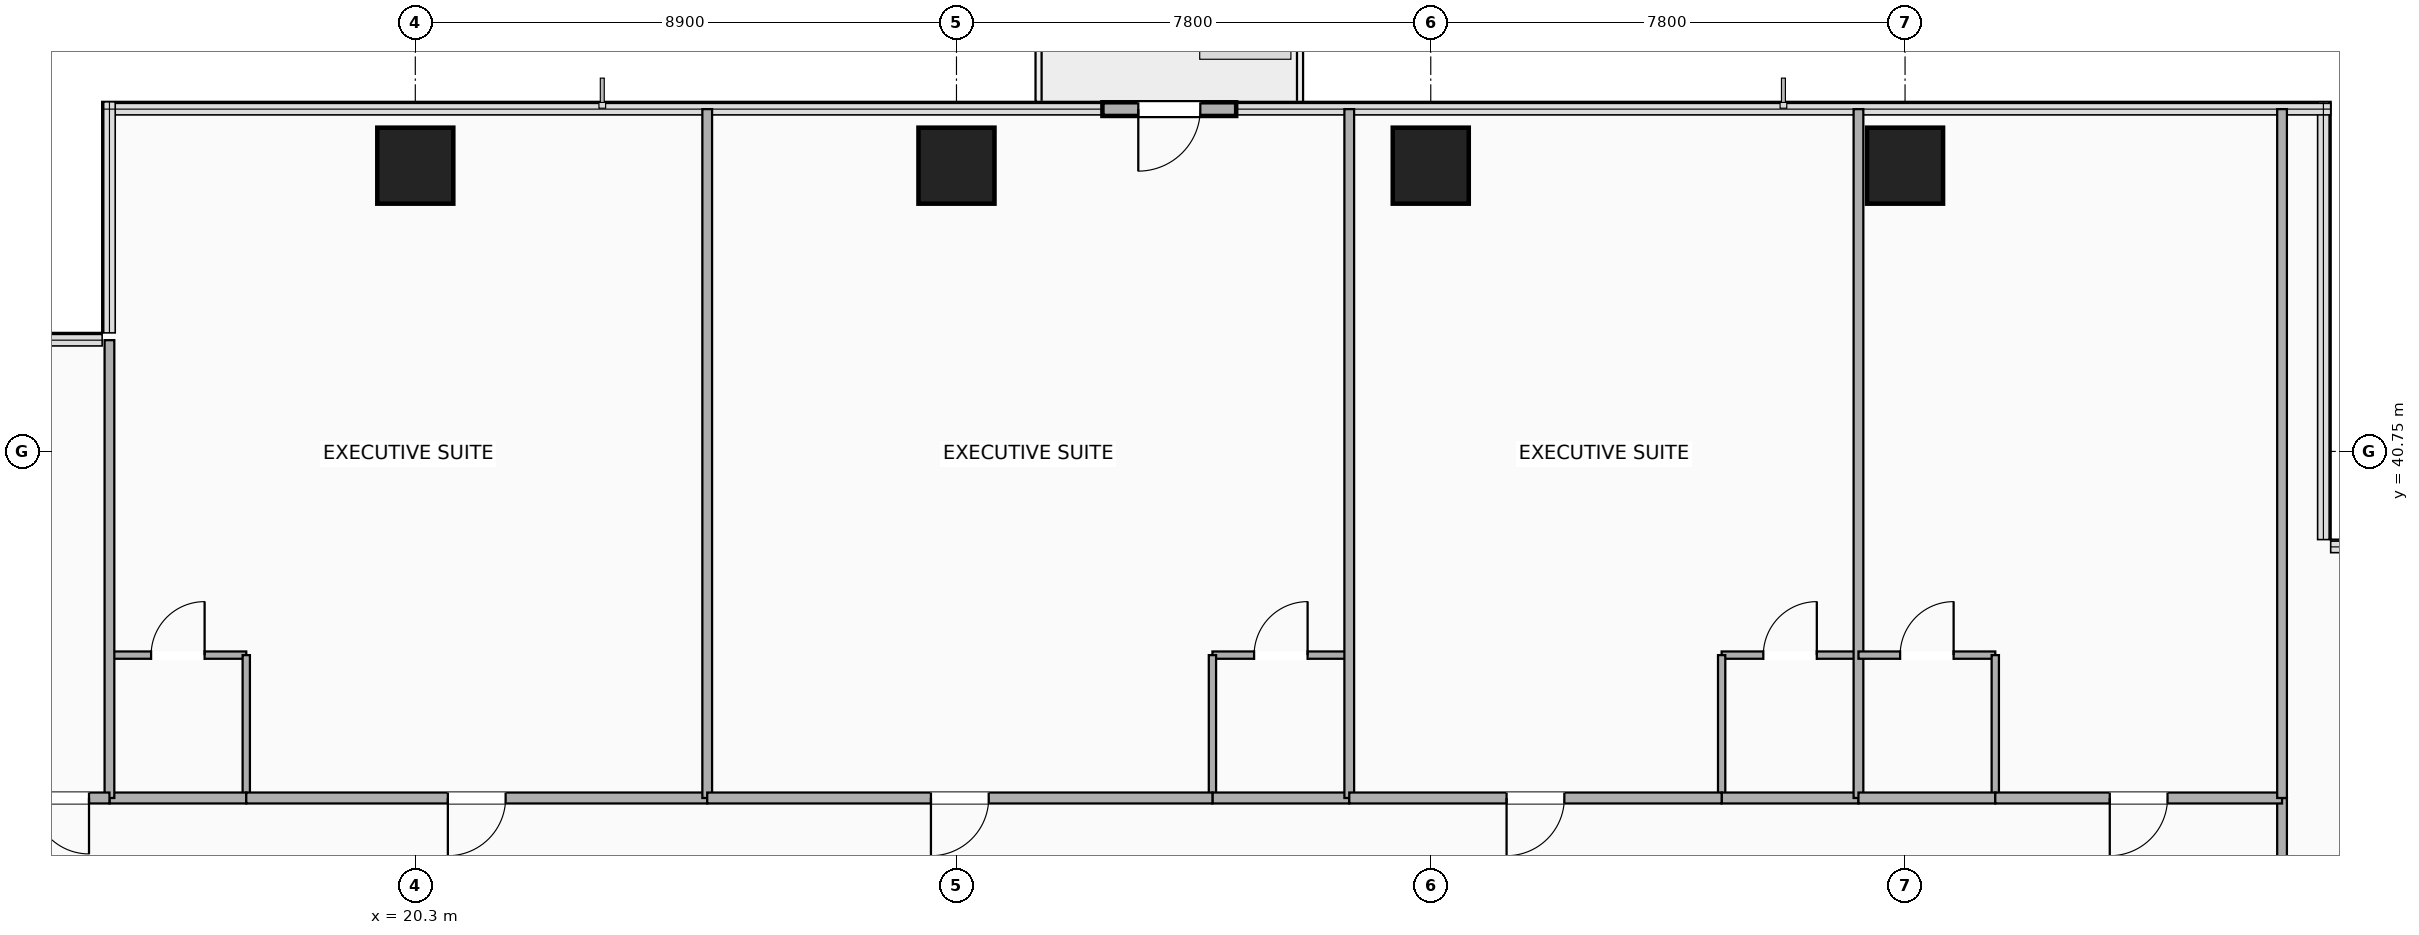
"""IFC4 building model, lengths in metres.
Left out: names, types, materials, properties, quantities, classifications, styles, units other than length and angle.
Written with IfcOpenShell. Run it as: python <this file> out.ifc"""

import sys

from ifc_helpers import new_model, si_unit, direction, frame, frame_2d, origin, origin_2d, place, context, subcontext, project, spatial, rectangle, extrude, element, fill, save


model = new_model("IFC4")
c1 = context("Model", 3, precision=1e-05, world=origin(), true_north=direction((0.0, 1.0)))
c2 = subcontext(c1, "Body", "Model", "MODEL_VIEW")
j1 = project(units=[si_unit("LENGTHUNIT", "METRE"), si_unit("PLANEANGLEUNIT", "RADIAN")], contexts=[c1])
p1 = place(None, origin())
s1 = spatial("IfcSite", under=j1, at=p1, CompositionType="ELEMENT")
p2 = place(p1, origin())
s2 = spatial("IfcBuilding", under=s1, at=p2, CompositionType="ELEMENT")
p3 = place(p2, frame((0.0, 0.0, 98.7)))
s3 = spatial("IfcBuildingStorey", under=s2, at=p3, CompositionType="ELEMENT", Elevation=98.7)
for number, where, z_axis, x_axis in (
    (1, (20.3, 45.45, -0.26), (0.0, 0.0, 1.0), (1.0, 0.0, 0.0)),
    (2, (29.2, 45.45, -0.26), (0.0, 0.0, 1.0), (1.0, 0.0, 0.0)),
    (3, (37.0, 45.45, -0.26), (0.0, 0.0, 1.0), (1.0, 0.0, 0.0)),
    (4, (44.8, 45.45, -0.26), (0.0, 0.0, 1.0), (1.0, 0.0, 0.0)),
):
    element("IfcColumn", number, at=place(p3, frame(where, z_axis=z_axis, x_axis=x_axis)), inside=s3, PredefinedType="COLUMN", context=c2, shape_type="SweptSolid", body=[
        extrude(rectangle(XDim=1.25, YDim=1.25, at=origin_2d()), origin(), (0.0, 0.0, 1.0), 3.5),
    ])
p4 = place(p3, frame((31.6, 46.38, 0.0), z_axis=(0.0, 0.0, 1.0), x_axis=(1.0, 0.0, 0.0)))
e5 = element("IfcWall", 5, at=p4, inside=s3, PredefinedType="SOLIDWALL", context=c2, shape_type="SweptSolid", body=[
    extrude(rectangle(XDim=2.2, YDim=0.225, at=frame_2d((1.1, 0.0))), origin(), (0.0, 0.0, 1.0), 3.24),
])
p5 = place(p4, frame((0.59, 0.0, 0.0)))
e6 = element("IfcOpeningElement", 6, at=p5, cuts=e5, PredefinedType="OPENING", context=c2, shape_type="SweptSolid", body=[
    extrude(rectangle(XDim=1.02, YDim=2.1, at=frame_2d((0.51, 1.05))), frame((0.0, 0.123, 0.0), z_axis=(0.0, -1.0, 0.0), x_axis=(1.0, 0.0, 0.0)), (0.0, 0.0, 1.0), 0.245),
])
p6 = place(p3, frame((51.0, 33.0, 0.0), z_axis=(0.0, 0.0, 1.0), x_axis=(0.0, 1.0, 0.0)))
e7 = element("IfcWall", 7, at=p6, inside=s3, PredefinedType="PARTITIONING", context=c2, shape_type="SweptSolid", body=[
    extrude(rectangle(XDim=2.05, YDim=0.16, at=frame_2d((1.025, 0.0))), origin(), (0.0, 0.0, 1.0), 2.313),
])
p7 = place(p3, frame((15.27, 37.4, 0.0), z_axis=(0.0, 0.0, 1.0), x_axis=(1.0, 0.0, 0.0)))
e8 = element("IfcWall", 8, at=p7, inside=s3, PredefinedType="PARTITIONING", context=c2, shape_type="SweptSolid", body=[
    extrude(rectangle(XDim=2.25, YDim=0.12, at=frame_2d((1.125, 0.0))), origin(), (0.0, 0.0, 1.0), 3.24),
])
p8 = place(p7, frame((1.565, 0.0, 0.0), z_axis=(0.0, 0.0, 1.0), x_axis=(-1.0, 0.0, 0.0)))
e9 = element("IfcOpeningElement", 9, at=p8, cuts=e8, PredefinedType="OPENING", context=c2, shape_type="SweptSolid", body=[
    extrude(rectangle(XDim=0.88, YDim=2.08, at=frame_2d((0.44, 1.04))), frame((0.0, 0.07, 0.0), z_axis=(0.0, -1.0, 0.0), x_axis=(1.0, 0.0, 0.0)), (0.0, 0.0, 1.0), 0.14),
])
p9 = place(p3, frame((17.52, 35.05, 0.0), z_axis=(0.0, 0.0, 1.0), x_axis=(0.0, 1.0, 0.0)))
e10 = element("IfcWall", 10, at=p9, inside=s3, PredefinedType="PARTITIONING", context=c2, shape_type="SweptSolid", body=[
    extrude(rectangle(XDim=2.35, YDim=0.12, at=frame_2d((1.175, 0.0))), origin(), (0.0, 0.0, 1.0), 3.24),
])
p10 = place(p3, frame((15.27, 35.05, 0.0), z_axis=(0.0, 0.0, 1.0), x_axis=(1.0, 0.0, 0.0)))
e11 = element("IfcWall", 11, at=p10, inside=s3, PredefinedType="PARTITIONING", context=c2, shape_type="SweptSolid", body=[
    extrude(rectangle(XDim=2.25, YDim=0.18, at=frame_2d((1.125, 0.0))), origin(), (0.0, 0.0, 1.0), 3.24),
])
p11 = place(p3, frame((17.52, 35.05, 0.0), z_axis=(0.0, 0.0, 1.0), x_axis=(1.0, 0.0, 0.0)))
e12 = element("IfcWall", 12, at=p11, inside=s3, PredefinedType="PARTITIONING", context=c2, shape_type="SweptSolid", body=[
    extrude(rectangle(XDim=7.581, YDim=0.18, at=frame_2d((3.79, 0.0))), origin(), (0.0, 0.0, 1.0), 2.313),
])
p12 = place(p11, frame((3.315, 0.0, 0.0)))
e13 = element("IfcOpeningElement", 13, at=p12, cuts=e12, PredefinedType="OPENING", context=c2, shape_type="SweptSolid", body=[
    extrude(rectangle(XDim=0.95, YDim=2.15, at=frame_2d((0.475, 1.075))), frame((0.0, 0.1, 0.0), z_axis=(0.0, -1.0, 0.0), x_axis=(1.0, 0.0, 0.0)), (0.0, 0.0, 1.0), 0.2),
])
p13 = place(p3, frame((15.27, 35.05, 0.0), z_axis=(0.0, 0.0, 1.0), x_axis=(0.0, 1.0, 0.0)))
e14 = element("IfcWall", 14, at=p13, inside=s3, PredefinedType="PARTITIONING", context=c2, shape_type="SweptSolid", body=[
    extrude(rectangle(XDim=7.53, YDim=0.16, at=frame_2d((3.765, 0.0))), origin(), (0.0, 0.0, 1.0), 3.24),
])
p14 = place(p3, frame((25.101, 35.05, 0.0), z_axis=(0.0, 0.0, 1.0), x_axis=(0.0, 1.0, 0.0)))
e15 = element("IfcWall", 15, at=p14, inside=s3, PredefinedType="PARTITIONING", context=c2, shape_type="SweptSolid", body=[
    extrude(rectangle(XDim=11.33, YDim=0.16, at=frame_2d((5.665, 0.0))), origin(), (0.0, 0.0, 1.0), 2.603),
])
p15 = place(p3, frame((33.41, 37.4, 0.0), z_axis=(0.0, 0.0, 1.0), x_axis=(1.0, 0.0, 0.0)))
e16 = element("IfcWall", 16, at=p15, inside=s3, PredefinedType="PARTITIONING", context=c2, shape_type="SweptSolid", body=[
    extrude(rectangle(XDim=2.25, YDim=0.12, at=frame_2d((1.125, 0.0))), origin(), (0.0, 0.0, 1.0), 3.24),
])
p16 = place(p15, frame((1.565, 0.0, 0.0), z_axis=(0.0, 0.0, 1.0), x_axis=(-1.0, 0.0, 0.0)))
e17 = element("IfcOpeningElement", 17, at=p16, cuts=e16, PredefinedType="OPENING", context=c2, shape_type="SweptSolid", body=[
    extrude(rectangle(XDim=0.88, YDim=2.08, at=frame_2d((0.44, 1.04))), frame((0.0, 0.07, 0.0), z_axis=(0.0, -1.0, 0.0), x_axis=(1.0, 0.0, 0.0)), (0.0, 0.0, 1.0), 0.14),
])
p17 = place(p3, frame((33.41, 35.05, 0.0), z_axis=(0.0, 0.0, 1.0), x_axis=(0.0, 1.0, 0.0)))
e18 = element("IfcWall", 18, at=p17, inside=s3, PredefinedType="PARTITIONING", context=c2, shape_type="SweptSolid", body=[
    extrude(rectangle(XDim=2.35, YDim=0.12, at=frame_2d((1.175, 0.0))), origin(), (0.0, 0.0, 1.0), 2.922),
])
p18 = place(p3, frame((33.41, 35.05, 0.0), z_axis=(0.0, 0.0, 1.0), x_axis=(1.0, 0.0, 0.0)))
e19 = element("IfcWall", 19, at=p18, inside=s3, PredefinedType="PARTITIONING", context=c2, shape_type="SweptSolid", body=[
    extrude(rectangle(XDim=2.25, YDim=0.18, at=frame_2d((1.125, 0.0))), origin(), (0.0, 0.0, 1.0), 3.24),
])
p19 = place(p3, frame((25.101, 35.05, 0.0), z_axis=(0.0, 0.0, 1.0), x_axis=(1.0, 0.0, 0.0)))
e20 = element("IfcWall", 20, at=p19, inside=s3, PredefinedType="PARTITIONING", context=c2, shape_type="SweptSolid", body=[
    extrude(rectangle(XDim=8.309, YDim=0.18, at=frame_2d((4.155, 0.0))), origin(), (0.0, 0.0, 1.0), 2.313),
])
p20 = place(p19, frame((3.679, 0.0, 0.0)))
e21 = element("IfcOpeningElement", 21, at=p20, cuts=e20, PredefinedType="OPENING", context=c2, shape_type="SweptSolid", body=[
    extrude(rectangle(XDim=0.95, YDim=2.15, at=frame_2d((0.475, 1.075))), frame((0.0, 0.1, 0.0), z_axis=(0.0, -1.0, 0.0), x_axis=(1.0, 0.0, 0.0)), (0.0, 0.0, 1.0), 0.2),
])
p21 = place(p3, frame((35.66, 35.05, 0.0), z_axis=(0.0, 0.0, 1.0), x_axis=(0.0, 1.0, 0.0)))
e22 = element("IfcWall", 22, at=p21, inside=s3, PredefinedType="PARTITIONING", context=c2, shape_type="SweptSolid", body=[
    extrude(rectangle(XDim=11.33, YDim=0.16, at=frame_2d((5.665, 0.0))), origin(), (0.0, 0.0, 1.0), 2.603),
])
p22 = place(p3, frame((41.784, 37.4, 0.0), z_axis=(0.0, 0.0, 1.0), x_axis=(1.0, 0.0, 0.0)))
e23 = element("IfcWall", 23, at=p22, inside=s3, PredefinedType="PARTITIONING", context=c2, shape_type="SweptSolid", body=[
    extrude(rectangle(XDim=2.25, YDim=0.12, at=frame_2d((1.125, 0.0))), origin(), (0.0, 0.0, 1.0), 3.24),
])
p23 = place(p22, frame((1.565, 0.0, 0.0), z_axis=(0.0, 0.0, 1.0), x_axis=(-1.0, 0.0, 0.0)))
e24 = element("IfcOpeningElement", 24, at=p23, cuts=e23, PredefinedType="OPENING", context=c2, shape_type="SweptSolid", body=[
    extrude(rectangle(XDim=0.88, YDim=2.08, at=frame_2d((0.44, 1.04))), frame((0.0, 0.07, 0.0), z_axis=(0.0, -1.0, 0.0), x_axis=(1.0, 0.0, 0.0)), (0.0, 0.0, 1.0), 0.14),
])
p24 = place(p3, frame((41.784, 35.05, 0.0), z_axis=(0.0, 0.0, 1.0), x_axis=(0.0, 1.0, 0.0)))
e25 = element("IfcWall", 25, at=p24, inside=s3, PredefinedType="PARTITIONING", context=c2, shape_type="SweptSolid", body=[
    extrude(rectangle(XDim=2.35, YDim=0.12, at=frame_2d((1.175, 0.0))), origin(), (0.0, 0.0, 1.0), 2.922),
])
p25 = place(p3, frame((41.784, 35.05, 0.0), z_axis=(0.0, 0.0, 1.0), x_axis=(1.0, 0.0, 0.0)))
e26 = element("IfcWall", 26, at=p25, inside=s3, PredefinedType="PARTITIONING", context=c2, shape_type="SweptSolid", body=[
    extrude(rectangle(XDim=2.25, YDim=0.18, at=frame_2d((1.125, 0.0))), origin(), (0.0, 0.0, 1.0), 3.24),
])
p26 = place(p3, frame((35.66, 35.05, 0.0), z_axis=(0.0, 0.0, 1.0), x_axis=(1.0, 0.0, 0.0)))
e27 = element("IfcWall", 27, at=p26, inside=s3, PredefinedType="PARTITIONING", context=c2, shape_type="SweptSolid", body=[
    extrude(rectangle(XDim=6.124, YDim=0.18, at=frame_2d((3.062, 0.0))), origin(), (0.0, 0.0, 1.0), 2.313),
])
p27 = place(p26, frame((2.587, 0.0, 0.0)))
e28 = element("IfcOpeningElement", 28, at=p27, cuts=e27, PredefinedType="OPENING", context=c2, shape_type="SweptSolid", body=[
    extrude(rectangle(XDim=0.95, YDim=2.15, at=frame_2d((0.475, 1.075))), frame((0.0, 0.1, 0.0), z_axis=(0.0, -1.0, 0.0), x_axis=(1.0, 0.0, 0.0)), (0.0, 0.0, 1.0), 0.2),
])
p28 = place(p3, frame((44.034, 35.05, 0.0), z_axis=(0.0, 0.0, 1.0), x_axis=(0.0, 1.0, 0.0)))
e29 = element("IfcWall", 29, at=p28, inside=s3, PredefinedType="PARTITIONING", context=c2, shape_type="SweptSolid", body=[
    extrude(rectangle(XDim=11.33, YDim=0.16, at=frame_2d((5.665, 0.0))), origin(), (0.0, 0.0, 1.0), 2.603),
])
p29 = place(p3, frame((44.034, 37.4, 0.0), z_axis=(0.0, 0.0, 1.0), x_axis=(1.0, 0.0, 0.0)))
e30 = element("IfcWall", 30, at=p29, inside=s3, PredefinedType="PARTITIONING", context=c2, shape_type="SweptSolid", body=[
    extrude(rectangle(XDim=2.25, YDim=0.12, at=frame_2d((1.125, 0.0))), origin(), (0.0, 0.0, 1.0), 2.313),
])
p30 = place(p29, frame((1.565, 0.0, 0.0), z_axis=(0.0, 0.0, 1.0), x_axis=(-1.0, 0.0, 0.0)))
e31 = element("IfcOpeningElement", 31, at=p30, cuts=e30, PredefinedType="OPENING", context=c2, shape_type="SweptSolid", body=[
    extrude(rectangle(XDim=0.88, YDim=2.08, at=frame_2d((0.44, 1.04))), frame((0.0, 0.07, 0.0), z_axis=(0.0, -1.0, 0.0), x_axis=(1.0, 0.0, 0.0)), (0.0, 0.0, 1.0), 0.14),
])
p31 = place(p3, frame((46.284, 35.05, 0.0), z_axis=(0.0, 0.0, 1.0), x_axis=(0.0, 1.0, 0.0)))
e32 = element("IfcWall", 32, at=p31, inside=s3, PredefinedType="PARTITIONING", context=c2, shape_type="SweptSolid", body=[
    extrude(rectangle(XDim=2.35, YDim=0.12, at=frame_2d((1.175, 0.0))), origin(), (0.0, 0.0, 1.0), 3.24),
])
p32 = place(p3, frame((44.034, 35.05, 0.0), z_axis=(0.0, 0.0, 1.0), x_axis=(1.0, 0.0, 0.0)))
e33 = element("IfcWall", 33, at=p32, inside=s3, PredefinedType="PARTITIONING", context=c2, shape_type="SweptSolid", body=[
    extrude(rectangle(XDim=2.25, YDim=0.18, at=frame_2d((1.125, 0.0))), origin(), (0.0, 0.0, 1.0), 2.313),
])
p33 = place(p3, frame((46.284, 35.05, 0.0), z_axis=(0.0, 0.0, 1.0), x_axis=(1.0, 0.0, 0.0)))
e34 = element("IfcWall", 34, at=p33, inside=s3, PredefinedType="PARTITIONING", context=c2, shape_type="SweptSolid", body=[
    extrude(rectangle(XDim=4.716, YDim=0.18, at=frame_2d((2.358, 0.0))), origin(), (0.0, 0.0, 1.0), 3.24),
])
p34 = place(p33, frame((1.883, 0.0, 0.0)))
e35 = element("IfcOpeningElement", 35, at=p34, cuts=e34, PredefinedType="OPENING", context=c2, shape_type="SweptSolid", body=[
    extrude(rectangle(XDim=0.95, YDim=2.15, at=frame_2d((0.475, 1.075))), frame((0.0, 0.1, 0.0), z_axis=(0.0, -1.0, 0.0), x_axis=(1.0, 0.0, 0.0)), (0.0, 0.0, 1.0), 0.2),
])
p35 = place(p3, frame((51.0, 35.05, 0.0), z_axis=(0.0, 0.0, 1.0), x_axis=(0.0, 1.0, 0.0)))
e36 = element("IfcWall", 36, at=p35, inside=s3, PredefinedType="PARTITIONING", context=c2, shape_type="SweptSolid", body=[
    extrude(rectangle(XDim=11.33, YDim=0.16, at=frame_2d((5.665, 0.0))), origin(), (0.0, 0.0, 1.0), 3.24),
])
p36 = place(p3, frame((11.47, 35.05, 0.0), z_axis=(0.0, 0.0, 1.0), x_axis=(1.0, 0.0, 0.0)))
e37 = element("IfcWall", 37, at=p36, inside=s3, PredefinedType="PARTITIONING", context=c2, shape_type="SweptSolid", body=[
    extrude(rectangle(XDim=3.8, YDim=0.18, at=frame_2d((1.9, 0.0))), origin(), (0.0, 0.0, 1.0), 3.24),
])
p37 = place(p36, frame((2.544, 0.0, 0.0)))
e38 = element("IfcOpeningElement", 38, at=p37, cuts=e37, PredefinedType="OPENING", context=c2, shape_type="SweptSolid", body=[
    extrude(rectangle(XDim=0.92, YDim=2.08, at=frame_2d((0.46, 1.04))), frame((0.0, 0.1, 0.0), z_axis=(0.0, -1.0, 0.0), x_axis=(1.0, 0.0, 0.0)), (0.0, 0.0, 1.0), 0.2),
])
p38 = place(p5, origin())
e39 = element("IfcDoor", 39, at=p38, inside=s3, OperationType="SINGLE_SWING_LEFT", PredefinedType="DOOR", context=c2, shape_type="SweptSolid", body=[
    extrude(rectangle(XDim=1.02, YDim=2.1, at=frame_2d((0.51, 1.05))), frame((0.0, 0.025, 0.0), z_axis=(0.0, -1.0, 0.0), x_axis=(1.0, 0.0, 0.0)), (0.0, 0.0, 1.0), 0.05),
])
fill(e6, e39)
p39 = place(p8, origin())
e40 = element("IfcDoor", 40, at=p39, inside=s3, OperationType="SINGLE_SWING_RIGHT", PredefinedType="DOOR", context=c2, shape_type="SweptSolid", body=[
    extrude(rectangle(XDim=0.88, YDim=2.08, at=frame_2d((0.44, 1.04))), frame((0.0, 0.025, 0.0), z_axis=(0.0, -1.0, 0.0), x_axis=(1.0, 0.0, 0.0)), (0.0, 0.0, 1.0), 0.05),
])
fill(e9, e40)
p40 = place(p12, origin())
e41 = element("IfcDoor", 41, at=p40, inside=s3, OperationType="SINGLE_SWING_LEFT", PredefinedType="DOOR", context=c2, shape_type="SweptSolid", body=[
    extrude(rectangle(XDim=0.95, YDim=2.15, at=frame_2d((0.475, 1.075))), frame((0.0, 0.025, 0.0), z_axis=(0.0, -1.0, 0.0), x_axis=(1.0, 0.0, 0.0)), (0.0, 0.0, 1.0), 0.05),
])
fill(e13, e41)
p41 = place(p16, origin())
e42 = element("IfcDoor", 42, at=p41, inside=s3, OperationType="SINGLE_SWING_RIGHT", PredefinedType="DOOR", context=c2, shape_type="SweptSolid", body=[
    extrude(rectangle(XDim=0.88, YDim=2.08, at=frame_2d((0.44, 1.04))), frame((0.0, 0.025, 0.0), z_axis=(0.0, -1.0, 0.0), x_axis=(1.0, 0.0, 0.0)), (0.0, 0.0, 1.0), 0.05),
])
fill(e17, e42)
p42 = place(p20, origin())
e43 = element("IfcDoor", 43, at=p42, inside=s3, OperationType="SINGLE_SWING_LEFT", PredefinedType="DOOR", context=c2, shape_type="SweptSolid", body=[
    extrude(rectangle(XDim=0.95, YDim=2.15, at=frame_2d((0.475, 1.075))), frame((0.0, 0.025, 0.0), z_axis=(0.0, -1.0, 0.0), x_axis=(1.0, 0.0, 0.0)), (0.0, 0.0, 1.0), 0.05),
])
fill(e21, e43)
p43 = place(p23, origin())
e44 = element("IfcDoor", 44, at=p43, inside=s3, OperationType="SINGLE_SWING_RIGHT", PredefinedType="DOOR", context=c2, shape_type="SweptSolid", body=[
    extrude(rectangle(XDim=0.88, YDim=2.08, at=frame_2d((0.44, 1.04))), frame((0.0, 0.025, 0.0), z_axis=(0.0, -1.0, 0.0), x_axis=(1.0, 0.0, 0.0)), (0.0, 0.0, 1.0), 0.05),
])
fill(e24, e44)
p44 = place(p27, origin())
e45 = element("IfcDoor", 45, at=p44, inside=s3, OperationType="SINGLE_SWING_LEFT", PredefinedType="DOOR", context=c2, shape_type="SweptSolid", body=[
    extrude(rectangle(XDim=0.95, YDim=2.15, at=frame_2d((0.475, 1.075))), frame((0.0, 0.025, 0.0), z_axis=(0.0, -1.0, 0.0), x_axis=(1.0, 0.0, 0.0)), (0.0, 0.0, 1.0), 0.05),
])
fill(e28, e45)
p45 = place(p30, origin())
e46 = element("IfcDoor", 46, at=p45, inside=s3, OperationType="SINGLE_SWING_RIGHT", PredefinedType="DOOR", context=c2, shape_type="SweptSolid", body=[
    extrude(rectangle(XDim=0.88, YDim=2.08, at=frame_2d((0.44, 1.04))), frame((0.0, 0.025, 0.0), z_axis=(0.0, -1.0, 0.0), x_axis=(1.0, 0.0, 0.0)), (0.0, 0.0, 1.0), 0.05),
])
fill(e31, e46)
p46 = place(p34, origin())
e47 = element("IfcDoor", 47, at=p46, inside=s3, OperationType="SINGLE_SWING_LEFT", PredefinedType="DOOR", context=c2, shape_type="SweptSolid", body=[
    extrude(rectangle(XDim=0.95, YDim=2.15, at=frame_2d((0.475, 1.075))), frame((0.0, 0.025, 0.0), z_axis=(0.0, -1.0, 0.0), x_axis=(1.0, 0.0, 0.0)), (0.0, 0.0, 1.0), 0.05),
])
fill(e35, e47)
p47 = place(p37, origin())
e48 = element("IfcDoor", 48, at=p47, inside=s3, OperationType="SINGLE_SWING_RIGHT", PredefinedType="DOOR", context=c2, shape_type="SweptSolid", body=[
    extrude(rectangle(XDim=0.92, YDim=2.08, at=frame_2d((0.46, 1.04))), frame((0.0, 0.025, 0.0), z_axis=(0.0, -1.0, 0.0), x_axis=(1.0, 0.0, 0.0)), (0.0, 0.0, 1.0), 0.05),
])
fill(e38, e48)
save(model, sys.argv[1])
